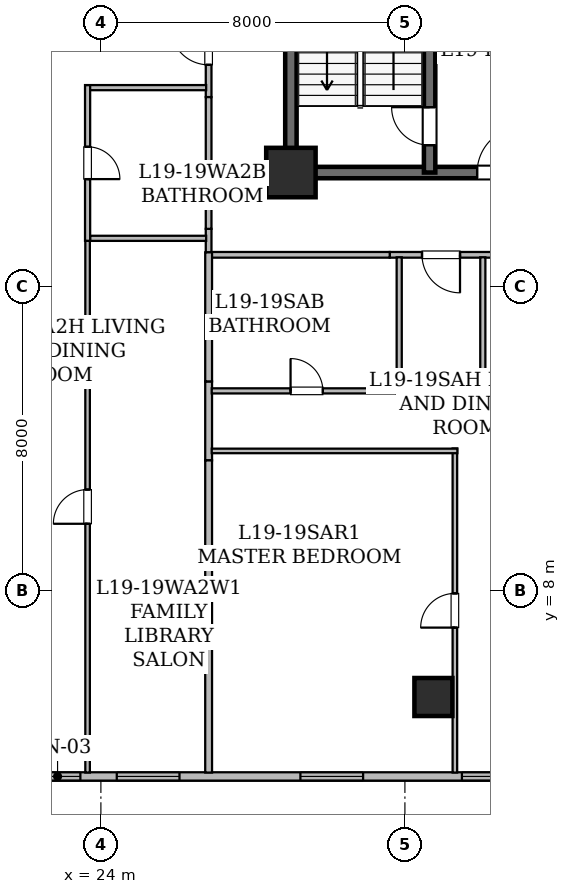
"""IFC4 building model, lengths in metres.
Left out: names, types, materials, properties, quantities, classifications, styles, units other than length and angle.
Written with IfcOpenShell. Run it as: python <this file> out.ifc"""

import sys

from ifc_helpers import new_model, si_unit, direction, frame, frame_2d, origin, origin_2d, place, context, subcontext, project, spatial, rectangle, hollow_rectangle, extrude, element, fill, save


model = new_model("IFC4")
c1 = context("Model", 3, precision=1e-05, world=origin(), true_north=direction((0.0, 1.0)))
c2 = subcontext(c1, "Body", "Model", "MODEL_VIEW")
j1 = project(units=[si_unit("LENGTHUNIT", "METRE"), si_unit("PLANEANGLEUNIT", "RADIAN")], contexts=[c1])
p1 = place(None, origin())
s1 = spatial("IfcSite", under=j1, at=p1, CompositionType="ELEMENT")
p2 = place(p1, origin())
s2 = spatial("IfcBuilding", under=s1, at=p2, CompositionType="ELEMENT")
p3 = place(p2, frame((0.0, 0.0, 77.1)))
s3 = spatial("IfcBuildingStorey", under=s2, at=p3, CompositionType="ELEMENT", Elevation=77.1)
p4 = place(p3, frame((29.0, 19.0, 0.0), z_axis=(0.0, 0.0, 1.0), x_axis=(1.0, 0.0, 0.0)))
e1 = element("IfcColumn", 1, at=p4, inside=s3, PredefinedType="COLUMN", context=c2, shape_type="SweptSolid", body=[
    extrude(hollow_rectangle(XDim=1.3, YDim=1.3, WallThickness=0.065, at=origin_2d()), origin(), (0.0, 0.0, 1.0), 3.65),
])
p5 = place(p3, frame((32.75, 5.2, 0.0), z_axis=(0.0, 0.0, 1.0), x_axis=(1.0, 0.0, 0.0)))
e2 = element("IfcColumn", 2, at=p5, inside=s3, PredefinedType="COLUMN", context=c2, shape_type="SweptSolid", body=[
    extrude(hollow_rectangle(XDim=1.0, YDim=1.0, WallThickness=0.05, at=origin_2d()), origin(), (0.0, 0.0, 1.0), 3.65),
])
p6 = place(p3, frame((45.683, 3.11, 0.0), z_axis=(0.0, 0.0, 1.0), x_axis=(-1.0, 0.0, 0.0)))
e3 = element("IfcWall", 3, at=p6, inside=s3, PredefinedType="STANDARD", context=c2, shape_type="SweptSolid", body=[
    extrude(rectangle(XDim=37.368, YDim=0.22, at=frame_2d((18.684, 0.0))), origin(), (0.0, 0.0, 1.0), 3.43),
])
p7 = place(p6, frame((31.194, 0.0, 0.85)))
e4 = element("IfcOpeningElement", 4, at=p7, cuts=e3, PredefinedType="OPENING", context=c2, shape_type="SweptSolid", body=[
    extrude(rectangle(XDim=1.65, YDim=1.55, at=frame_2d((0.825, 0.775))), frame((0.0, 0.12, 0.0), z_axis=(0.0, -1.0, 0.0), x_axis=(1.0, 0.0, 0.0)), (0.0, 0.0, 1.0), 0.24),
])
p8 = place(p6, frame((19.615, 0.0, 0.85)))
e5 = element("IfcOpeningElement", 5, at=p8, cuts=e3, PredefinedType="OPENING", context=c2, shape_type="SweptSolid", body=[
    extrude(rectangle(XDim=1.65, YDim=1.55, at=frame_2d((0.825, 0.775))), frame((0.0, 0.12, 0.0), z_axis=(0.0, -1.0, 0.0), x_axis=(1.0, 0.0, 0.0)), (0.0, 0.0, 1.0), 0.24),
])
p9 = place(p6, frame((22.223, 0.0, 0.8)))
e6 = element("IfcOpeningElement", 6, at=p9, cuts=e3, PredefinedType="OPENING", context=c2, shape_type="SweptSolid", body=[
    extrude(rectangle(XDim=1.2, YDim=1.5, at=frame_2d((0.6, 0.75))), frame((0.0, 0.12, 0.0), z_axis=(0.0, -1.0, 0.0), x_axis=(1.0, 0.0, 0.0)), (0.0, 0.0, 1.0), 0.24),
])
p10 = place(p6, frame((25.65, 0.0, 0.85)))
e7 = element("IfcOpeningElement", 7, at=p10, cuts=e3, PredefinedType="OPENING", context=c2, shape_type="SweptSolid", body=[
    extrude(rectangle(XDim=1.65, YDim=1.55, at=frame_2d((0.825, 0.775))), frame((0.0, 0.12, 0.0), z_axis=(0.0, -1.0, 0.0), x_axis=(1.0, 0.0, 0.0)), (0.0, 0.0, 1.0), 0.24),
])
p11 = place(p6, frame((10.983, 0.0, 0.8)))
e8 = element("IfcOpeningElement", 8, at=p11, cuts=e3, PredefinedType="OPENING", context=c2, shape_type="SweptSolid", body=[
    extrude(rectangle(XDim=1.2, YDim=1.5, at=frame_2d((0.6, 0.75))), frame((0.0, 0.12, 0.0), z_axis=(0.0, -1.0, 0.0), x_axis=(1.0, 0.0, 0.0)), (0.0, 0.0, 1.0), 0.24),
])
p12 = place(p6, frame((14.783, 0.0, 0.85)))
e9 = element("IfcOpeningElement", 9, at=p12, cuts=e3, PredefinedType="OPENING", context=c2, shape_type="SweptSolid", body=[
    extrude(rectangle(XDim=1.65, YDim=1.55, at=frame_2d((0.825, 0.775))), frame((0.0, 0.12, 0.0), z_axis=(0.0, -1.0, 0.0), x_axis=(1.0, 0.0, 0.0)), (0.0, 0.0, 1.0), 0.24),
])
p13 = place(p6, frame((6.733, 0.0, 0.85)))
e10 = element("IfcOpeningElement", 10, at=p13, cuts=e3, PredefinedType="OPENING", context=c2, shape_type="SweptSolid", body=[
    extrude(rectangle(XDim=1.65, YDim=1.55, at=frame_2d((0.825, 0.775))), frame((0.0, 0.12, 0.0), z_axis=(0.0, -1.0, 0.0), x_axis=(1.0, 0.0, 0.0)), (0.0, 0.0, 1.0), 0.24),
])
p14 = place(p6, frame((2.228, 0.0, 0.85)))
e11 = element("IfcOpeningElement", 11, at=p14, cuts=e3, PredefinedType="OPENING", context=c2, shape_type="SweptSolid", body=[
    extrude(rectangle(XDim=1.65, YDim=1.55, at=frame_2d((0.825, 0.775))), frame((0.0, 0.12, 0.0), z_axis=(0.0, -1.0, 0.0), x_axis=(1.0, 0.0, 0.0)), (0.0, 0.0, 1.0), 0.24),
])
p15 = place(p6, frame((0.187, 0.0, 0.8)))
e12 = element("IfcOpeningElement", 12, at=p15, cuts=e3, PredefinedType="OPENING", context=c2, shape_type="SweptSolid", body=[
    extrude(rectangle(XDim=1.2, YDim=1.5, at=frame_2d((0.6, 0.75))), frame((0.0, 0.12, 0.0), z_axis=(0.0, -1.0, 0.0), x_axis=(1.0, 0.0, 0.0)), (0.0, 0.0, 1.0), 0.24),
])
p16 = place(p3, frame((29.0, 19.0, 0.0), z_axis=(0.0, 0.0, 1.0), x_axis=(0.0, 1.0, 0.0)))
e13 = element("IfcWall", 13, at=p16, inside=s3, PredefinedType="SHEAR", context=c2, shape_type="SweptSolid", body=[
    extrude(rectangle(XDim=9.0, YDim=0.3, at=frame_2d((4.5, 0.0))), origin(), (0.0, 0.0, 1.0), 3.43),
])
p17 = place(p3, frame((29.0, 19.0, 0.0), z_axis=(0.0, 0.0, 1.0), x_axis=(1.0, 0.0, 0.0)))
e14 = element("IfcWall", 14, at=p17, inside=s3, PredefinedType="SHEAR", context=c2, shape_type="SweptSolid", body=[
    extrude(rectangle(XDim=10.4, YDim=0.3, at=frame_2d((5.2, 0.0))), origin(), (0.0, 0.0, 1.0), 3.43),
])
p18 = place(p17, frame((4.9, 0.0, 0.0)))
e15 = element("IfcOpeningElement", 15, at=p18, cuts=e14, PredefinedType="OPENING", context=c2, shape_type="SweptSolid", body=[
    extrude(rectangle(XDim=1.2, YDim=2.15, at=frame_2d((0.6, 1.075))), frame((0.0, 0.16, 0.0), z_axis=(0.0, -1.0, 0.0), x_axis=(1.0, 0.0, 0.0)), (0.0, 0.0, 1.0), 0.32),
])
p19 = place(p3, frame((32.65, 19.0, 0.0), z_axis=(0.0, 0.0, 1.0), x_axis=(0.0, 1.0, 0.0)))
e16 = element("IfcWall", 16, at=p19, inside=s3, PredefinedType="SHEAR", context=c2, shape_type="SweptSolid", body=[
    extrude(rectangle(XDim=9.0, YDim=0.3, at=frame_2d((4.5, 0.0))), origin(), (0.0, 0.0, 1.0), 3.43),
])
p20 = place(p19, frame((0.72, 0.0, 0.0)))
e17 = element("IfcOpeningElement", 17, at=p20, cuts=e16, PredefinedType="OPENING", context=c2, shape_type="SweptSolid", body=[
    extrude(rectangle(XDim=1.0, YDim=2.15, at=frame_2d((0.5, 1.075))), frame((0.0, 0.16, 0.0), z_axis=(0.0, -1.0, 0.0), x_axis=(1.0, 0.0, 0.0)), (0.0, 0.0, 1.0), 0.32),
])
p21 = place(p3, frame((26.835, 16.9, 0.0), z_axis=(0.0, 0.0, 1.0), x_axis=(0.0, 1.0, 0.0)))
e18 = element("IfcWall", 18, at=p21, inside=s3, PredefinedType="STANDARD", context=c2, shape_type="SweptSolid", body=[
    extrude(rectangle(XDim=0.618, YDim=0.15, at=frame_2d((0.309, 0.0))), origin(), (0.0, 0.0, 1.0), 3.43),
])
p22 = place(p3, frame((26.835, 20.985, 0.0), z_axis=(0.0, 0.0, 1.0), x_axis=(0.0, 1.0, 0.0)))
e19 = element("IfcWall", 19, at=p22, inside=s3, PredefinedType="STANDARD", context=c2, shape_type="SweptSolid", body=[
    extrude(rectangle(XDim=2.698, YDim=0.15, at=frame_2d((1.349, 0.0))), origin(), (0.0, 0.0, 1.0), 3.43),
])
p23 = place(p22, frame((0.849, 0.0, 0.0)))
e20 = element("IfcOpeningElement", 20, at=p23, cuts=e19, PredefinedType="OPENING", context=c2, shape_type="SweptSolid", body=[
    extrude(rectangle(XDim=1.0, YDim=2.15, at=frame_2d((0.5, 1.075))), frame((0.0, 0.085, 0.0), z_axis=(0.0, -1.0, 0.0), x_axis=(1.0, 0.0, 0.0)), (0.0, 0.0, 1.0), 0.17),
])
p24 = place(p3, frame((26.835, 17.518, 0.0), z_axis=(0.0, 0.0, 1.0), x_axis=(0.0, 1.0, 0.0)))
e21 = element("IfcWall", 21, at=p24, inside=s3, PredefinedType="STANDARD", context=c2, shape_type="SweptSolid", body=[
    extrude(rectangle(XDim=3.467, YDim=0.15, at=frame_2d((1.733, 0.0))), origin(), (0.0, 0.0, 1.0), 2.647),
])
p25 = place(p3, frame((34.299, 16.835, 0.0), z_axis=(0.0, 0.0, 1.0), x_axis=(-1.0, 0.0, 0.0)))
e22 = element("IfcWall", 22, at=p25, inside=s3, PredefinedType="STANDARD", context=c2, shape_type="SweptSolid", body=[
    extrude(rectangle(XDim=2.698, YDim=0.15, at=frame_2d((1.349, 0.0))), origin(), (0.0, 0.0, 1.0), 3.43),
])
p26 = place(p25, frame((0.849, 0.0, 0.0)))
e23 = element("IfcOpeningElement", 23, at=p26, cuts=e22, PredefinedType="OPENING", context=c2, shape_type="SweptSolid", body=[
    extrude(rectangle(XDim=1.0, YDim=2.15, at=frame_2d((0.5, 1.075))), frame((0.0, 0.085, 0.0), z_axis=(0.0, -1.0, 0.0), x_axis=(1.0, 0.0, 0.0)), (0.0, 0.0, 1.0), 0.17),
])
p27 = place(p3, frame((31.601, 16.835, 0.0), z_axis=(0.0, 0.0, 1.0), x_axis=(-1.0, 0.0, 0.0)))
e24 = element("IfcWall", 24, at=p27, inside=s3, PredefinedType="STANDARD", context=c2, shape_type="SweptSolid", body=[
    extrude(rectangle(XDim=4.701, YDim=0.15, at=frame_2d((2.351, 0.0))), origin(), (0.0, 0.0, 1.0), 2.647),
])
p28 = place(p3, frame((23.65, 3.212, 0.0), z_axis=(0.0, 0.0, 1.0), x_axis=(0.0, 1.0, 0.0)))
e25 = element("IfcWall", 25, at=p28, inside=s3, PredefinedType="PARTITIONING", context=c2, shape_type="SweptSolid", body=[
    extrude(rectangle(XDim=13.992, YDim=0.12, at=frame_2d((6.996, 0.0))), origin(), (0.0, 0.0, 1.0), 2.803),
])
p29 = place(p28, frame((6.546, 0.0, 0.0)))
e26 = element("IfcOpeningElement", 26, at=p29, cuts=e25, PredefinedType="OPENING", context=c2, shape_type="SweptSolid", body=[
    extrude(rectangle(XDim=0.9, YDim=2.1, at=frame_2d((0.45, 1.05))), frame((0.0, 0.07, 0.0), z_axis=(0.0, -1.0, 0.0), x_axis=(1.0, 0.0, 0.0)), (0.0, 0.0, 1.0), 0.14),
])
p30 = place(p3, frame((23.715, 17.269, 0.0), z_axis=(0.0, 0.0, 1.0), x_axis=(1.0, 0.0, 0.0)))
e27 = element("IfcWall", 27, at=p30, inside=s3, PredefinedType="PARTITIONING", context=c2, shape_type="SweptSolid", body=[
    extrude(rectangle(XDim=3.055, YDim=0.135, at=frame_2d((1.527, 0.0))), origin(), (0.0, 0.0, 1.0), 3.43),
])
p31 = place(p3, frame((26.835, 13.504, 0.0), z_axis=(0.0, 0.0, 1.0), x_axis=(0.0, -1.0, 0.0)))
e28 = element("IfcWall", 28, at=p31, inside=s3, PredefinedType="STANDARD", context=c2, shape_type="SweptSolid", body=[
    extrude(rectangle(XDim=2.078, YDim=0.18, at=frame_2d((1.039, 0.0))), origin(), (0.0, 0.0, 1.0), 3.43),
])
p32 = place(p3, frame((26.835, 16.9, 0.0), z_axis=(0.0, 0.0, 1.0), x_axis=(0.0, -1.0, 0.0)))
e29 = element("IfcWall", 29, at=p32, inside=s3, PredefinedType="STANDARD", context=c2, shape_type="SweptSolid", body=[
    extrude(rectangle(XDim=3.396, YDim=0.18, at=frame_2d((1.698, 0.0))), origin(), (0.0, 0.0, 1.0), 3.43),
])
p33 = place(p3, frame((26.835, 11.426, 0.0), z_axis=(0.0, 0.0, 1.0), x_axis=(0.0, -1.0, 0.0)))
e30 = element("IfcWall", 30, at=p33, inside=s3, PredefinedType="STANDARD", context=c2, shape_type="SweptSolid", body=[
    extrude(rectangle(XDim=8.214, YDim=0.18, at=frame_2d((4.107, 0.0))), origin(), (0.0, 0.0, 1.0), 2.803),
])
p34 = place(p3, frame((26.77, 21.234, 0.0), z_axis=(0.0, 0.0, 1.0), x_axis=(-1.0, 0.0, 0.0)))
e31 = element("IfcWall", 31, at=p34, inside=s3, PredefinedType="PARTITIONING", context=c2, shape_type="SweptSolid", body=[
    extrude(rectangle(XDim=3.185, YDim=0.135, at=frame_2d((1.593, 0.0))), origin(), (0.0, 0.0, 1.0), 3.43),
])
p35 = place(p3, frame((23.65, 21.299, 0.0), z_axis=(0.0, 0.0, 1.0), x_axis=(0.0, -1.0, 0.0)))
e32 = element("IfcWall", 32, at=p35, inside=s3, PredefinedType="PARTITIONING", context=c2, shape_type="SweptSolid", body=[
    extrude(rectangle(XDim=4.095, YDim=0.135, at=frame_2d((2.047, 0.0))), origin(), (0.0, 0.0, 1.0), 2.647),
])
p36 = place(p35, frame((1.622, 0.0, 0.0)))
e33 = element("IfcOpeningElement", 33, at=p36, cuts=e32, PredefinedType="OPENING", context=c2, shape_type="SweptSolid", body=[
    extrude(rectangle(XDim=0.85, YDim=2.1, at=frame_2d((0.425, 1.05))), frame((0.0, 0.077, 0.0), z_axis=(0.0, -1.0, 0.0), x_axis=(1.0, 0.0, 0.0)), (0.0, 0.0, 1.0), 0.155),
])
p37 = place(p3, frame((26.917, 13.255, 0.0), z_axis=(0.0, 0.0, 1.0), x_axis=(1.0, 0.0, 0.0)))
e34 = element("IfcWall", 34, at=p37, inside=s3, PredefinedType="PARTITIONING", context=c2, shape_type="SweptSolid", body=[
    extrude(rectangle(XDim=4.998, YDim=0.135, at=frame_2d((2.499, 0.0))), origin(), (0.0, 0.0, 1.0), 2.647),
])
p38 = place(p37, frame((2.074, 0.0, 0.0)))
e35 = element("IfcOpeningElement", 35, at=p38, cuts=e34, PredefinedType="OPENING", context=c2, shape_type="SweptSolid", body=[
    extrude(rectangle(XDim=0.85, YDim=2.1, at=frame_2d((0.425, 1.05))), frame((0.0, 0.077, 0.0), z_axis=(0.0, -1.0, 0.0), x_axis=(1.0, 0.0, 0.0)), (0.0, 0.0, 1.0), 0.155),
])
for number, where, z_axis, x_axis in (
    (36, (31.85, 13.19, 0.0), (0.0, 0.0, 1.0), (0.0, 1.0, 0.0)),
    (37, (34.05, 16.77, 0.0), (0.0, 0.0, 1.0), (0.0, -1.0, 0.0)),
):
    element("IfcWall", number, at=place(p3, frame(where, z_axis=z_axis, x_axis=x_axis)), inside=s3, PredefinedType="PARTITIONING", context=c2, shape_type="SweptSolid", body=[
        extrude(rectangle(XDim=3.58, YDim=0.135, at=frame_2d((1.79, 0.0))), origin(), (0.0, 0.0, 1.0), 3.43),
    ])
p39 = place(p3, frame((33.985, 13.255, 0.0), z_axis=(0.0, 0.0, 1.0), x_axis=(1.0, 0.0, 0.0)))
e38 = element("IfcWall", 38, at=p39, inside=s3, PredefinedType="PARTITIONING", context=c2, shape_type="SweptSolid", body=[
    extrude(rectangle(XDim=7.315, YDim=0.135, at=frame_2d((3.657, 0.0))), origin(), (0.0, 0.0, 1.0), 3.43),
])
p40 = place(p39, frame((3.233, 0.0, 0.0)))
e39 = element("IfcOpeningElement", 39, at=p40, cuts=e38, PredefinedType="OPENING", context=c2, shape_type="SweptSolid", body=[
    extrude(rectangle(XDim=0.85, YDim=2.1, at=frame_2d((0.425, 1.05))), frame((0.0, 0.077, 0.0), z_axis=(0.0, -1.0, 0.0), x_axis=(1.0, 0.0, 0.0)), (0.0, 0.0, 1.0), 0.155),
])
p41 = place(p3, frame((33.315, 3.212, 0.0), z_axis=(0.0, 0.0, 1.0), x_axis=(0.0, 1.0, 0.0)))
e40 = element("IfcWall", 40, at=p41, inside=s3, PredefinedType="PARTITIONING", context=c2, shape_type="SweptSolid", body=[
    extrude(rectangle(XDim=8.528, YDim=0.12, at=frame_2d((4.264, 0.0))), origin(), (0.0, 0.0, 1.0), 2.803),
])
p42 = place(p41, frame((3.814, 0.0, 0.0)))
e41 = element("IfcOpeningElement", 41, at=p42, cuts=e40, PredefinedType="OPENING", context=c2, shape_type="SweptSolid", body=[
    extrude(rectangle(XDim=0.9, YDim=2.1, at=frame_2d((0.45, 1.05))), frame((0.0, 0.07, 0.0), z_axis=(0.0, -1.0, 0.0), x_axis=(1.0, 0.0, 0.0)), (0.0, 0.0, 1.0), 0.14),
])
p43 = place(p3, frame((33.38, 11.675, 0.0), z_axis=(0.0, 0.0, 1.0), x_axis=(-1.0, 0.0, 0.0)))
e42 = element("IfcWall", 42, at=p43, inside=s3, PredefinedType="PARTITIONING", context=c2, shape_type="SweptSolid", body=[
    extrude(rectangle(XDim=6.463, YDim=0.12, at=frame_2d((3.231, 0.0))), origin(), (0.0, 0.0, 1.0), 2.647),
])
p44 = place(p8, origin())
e43 = element("IfcWindow", 43, at=p44, inside=s3, PartitioningType="SINGLE_PANEL", PredefinedType="WINDOW", context=c2, shape_type="SweptSolid", body=[
    extrude(rectangle(XDim=1.65, YDim=1.55, at=frame_2d((0.825, 0.775))), frame((0.0, 0.03, 0.0), z_axis=(0.0, -1.0, 0.0), x_axis=(1.0, 0.0, 0.0)), (0.0, 0.0, 1.0), 0.06),
])
fill(e5, e43)
p45 = place(p9, origin())
e44 = element("IfcWindow", 44, at=p45, inside=s3, PartitioningType="SINGLE_PANEL", PredefinedType="WINDOW", context=c2, shape_type="SweptSolid", body=[
    extrude(rectangle(XDim=1.2, YDim=1.5, at=frame_2d((0.6, 0.75))), frame((0.0, 0.03, 0.0), z_axis=(0.0, -1.0, 0.0), x_axis=(1.0, 0.0, 0.0)), (0.0, 0.0, 1.0), 0.06),
])
fill(e6, e44)
p46 = place(p11, origin())
e45 = element("IfcWindow", 45, at=p46, inside=s3, PartitioningType="SINGLE_PANEL", PredefinedType="WINDOW", context=c2, shape_type="SweptSolid", body=[
    extrude(rectangle(XDim=1.2, YDim=1.5, at=frame_2d((0.6, 0.75))), frame((0.0, 0.03, 0.0), z_axis=(0.0, -1.0, 0.0), x_axis=(1.0, 0.0, 0.0)), (0.0, 0.0, 1.0), 0.06),
])
fill(e8, e45)
p47 = place(p12, origin())
e46 = element("IfcWindow", 46, at=p47, inside=s3, PartitioningType="SINGLE_PANEL", PredefinedType="WINDOW", context=c2, shape_type="SweptSolid", body=[
    extrude(rectangle(XDim=1.65, YDim=1.55, at=frame_2d((0.825, 0.775))), frame((0.0, 0.03, 0.0), z_axis=(0.0, -1.0, 0.0), x_axis=(1.0, 0.0, 0.0)), (0.0, 0.0, 1.0), 0.06),
])
fill(e9, e46)
p48 = place(p20, origin())
e47 = element("IfcDoor", 47, at=p48, inside=s3, OperationType="SINGLE_SWING_RIGHT", PredefinedType="DOOR", context=c2, shape_type="SweptSolid", body=[
    extrude(rectangle(XDim=1.0, YDim=2.15, at=frame_2d((0.5, 1.075))), frame((0.0, 0.025, 0.0), z_axis=(0.0, -1.0, 0.0), x_axis=(1.0, 0.0, 0.0)), (0.0, 0.0, 1.0), 0.05),
])
fill(e17, e47)
p49 = place(p18, origin())
e48 = element("IfcDoor", 48, at=p49, inside=s3, OperationType="SINGLE_SWING_RIGHT", PredefinedType="DOOR", context=c2, shape_type="SweptSolid", body=[
    extrude(rectangle(XDim=1.2, YDim=2.15, at=frame_2d((0.6, 1.075))), frame((0.0, 0.025, 0.0), z_axis=(0.0, -1.0, 0.0), x_axis=(1.0, 0.0, 0.0)), (0.0, 0.0, 1.0), 0.05),
])
fill(e15, e48)
p50 = place(p23, origin())
e49 = element("IfcDoor", 49, at=p50, inside=s3, OperationType="SINGLE_SWING_RIGHT", PredefinedType="DOOR", context=c2, shape_type="SweptSolid", body=[
    extrude(rectangle(XDim=1.0, YDim=2.15, at=frame_2d((0.5, 1.075))), frame((0.0, 0.025, 0.0), z_axis=(0.0, -1.0, 0.0), x_axis=(1.0, 0.0, 0.0)), (0.0, 0.0, 1.0), 0.05),
])
fill(e20, e49)
p51 = place(p26, origin())
e50 = element("IfcDoor", 50, at=p51, inside=s3, OperationType="SINGLE_SWING_LEFT", PredefinedType="DOOR", context=c2, shape_type="SweptSolid", body=[
    extrude(rectangle(XDim=1.0, YDim=2.15, at=frame_2d((0.5, 1.075))), frame((0.0, 0.025, 0.0), z_axis=(0.0, -1.0, 0.0), x_axis=(1.0, 0.0, 0.0)), (0.0, 0.0, 1.0), 0.05),
])
fill(e23, e50)
p52 = place(p29, origin())
e51 = element("IfcDoor", 51, at=p52, inside=s3, OperationType="SINGLE_SWING_LEFT", PredefinedType="DOOR", context=c2, shape_type="SweptSolid", body=[
    extrude(rectangle(XDim=0.9, YDim=2.1, at=frame_2d((0.45, 1.05))), frame((0.0, 0.025, 0.0), z_axis=(0.0, -1.0, 0.0), x_axis=(1.0, 0.0, 0.0)), (0.0, 0.0, 1.0), 0.05),
])
fill(e26, e51)
p53 = place(p36, origin())
e52 = element("IfcDoor", 52, at=p53, inside=s3, OperationType="SINGLE_SWING_RIGHT", PredefinedType="DOOR", context=c2, shape_type="SweptSolid", body=[
    extrude(rectangle(XDim=0.85, YDim=2.1, at=frame_2d((0.425, 1.05))), frame((0.0, 0.025, 0.0), z_axis=(0.0, -1.0, 0.0), x_axis=(1.0, 0.0, 0.0)), (0.0, 0.0, 1.0), 0.05),
])
fill(e33, e52)
p54 = place(p38, origin())
e53 = element("IfcDoor", 53, at=p54, inside=s3, OperationType="SINGLE_SWING_LEFT", PredefinedType="DOOR", context=c2, shape_type="SweptSolid", body=[
    extrude(rectangle(XDim=0.85, YDim=2.1, at=frame_2d((0.425, 1.05))), frame((0.0, 0.025, 0.0), z_axis=(0.0, -1.0, 0.0), x_axis=(1.0, 0.0, 0.0)), (0.0, 0.0, 1.0), 0.05),
])
fill(e35, e53)
p55 = place(p42, origin())
e54 = element("IfcDoor", 54, at=p55, inside=s3, OperationType="SINGLE_SWING_LEFT", PredefinedType="DOOR", context=c2, shape_type="SweptSolid", body=[
    extrude(rectangle(XDim=0.9, YDim=2.1, at=frame_2d((0.45, 1.05))), frame((0.0, 0.025, 0.0), z_axis=(0.0, -1.0, 0.0), x_axis=(1.0, 0.0, 0.0)), (0.0, 0.0, 1.0), 0.05),
])
fill(e41, e54)
save(model, sys.argv[1])
